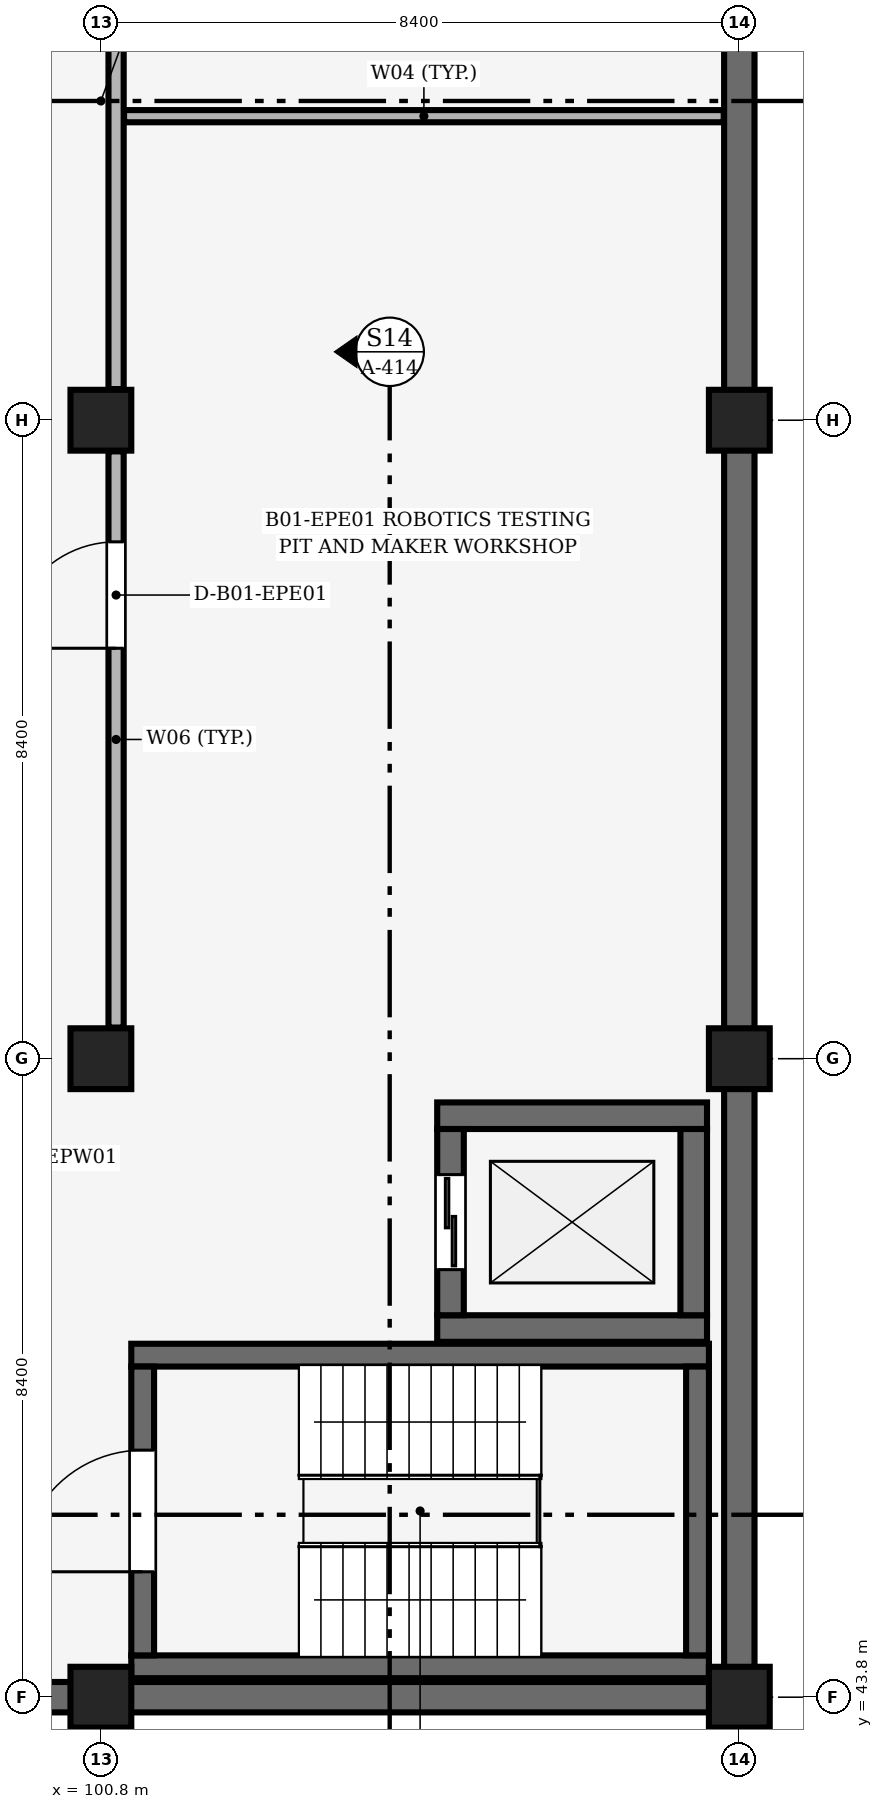
"""IFC4 building model, lengths in metres.
Left out: names, types, materials, properties, quantities, classifications, styles, units other than length and angle.
Written with IfcOpenShell. Run it as: python <this file> out.ifc"""

import sys

from ifc_helpers import new_model, si_unit, direction, frame, frame_2d, origin, origin_2d, place, context, subcontext, project, spatial, rectangle, extrude, element, fill, save


model = new_model("IFC4")
c1 = context("Model", 3, precision=1e-05, world=origin(), true_north=direction((0.0, 1.0)))
c2 = subcontext(c1, "Body", "Model", "MODEL_VIEW")
j1 = project(units=[si_unit("LENGTHUNIT", "METRE"), si_unit("PLANEANGLEUNIT", "RADIAN")], contexts=[c1])
p1 = place(None, origin())
s1 = spatial("IfcSite", under=j1, at=p1, CompositionType="ELEMENT")
p2 = place(p1, origin())
s2 = spatial("IfcBuilding", under=s1, at=p2, CompositionType="ELEMENT")
p3 = place(p2, frame((0.0, 0.0, -4.2)))
s3 = spatial("IfcBuildingStorey", under=s2, at=p3, CompositionType="ELEMENT", Elevation=-4.2)
for number, where, z_axis, x_axis in (
    (1, (100.8, 43.8, 0.0), (0.0, 0.0, 1.0), (1.0, 0.0, 0.0)),
    (2, (100.8, 52.2, 0.0), (0.0, 0.0, 1.0), (1.0, 0.0, 0.0)),
    (3, (100.8, 60.6, 0.0), (0.0, 0.0, 1.0), (1.0, 0.0, 0.0)),
    (4, (109.2, 43.8, 0.0), (0.0, 0.0, 1.0), (1.0, 0.0, 0.0)),
    (5, (109.2, 52.2, 0.0), (0.0, 0.0, 1.0), (1.0, 0.0, 0.0)),
    (6, (109.2, 60.6, 0.0), (0.0, 0.0, 1.0), (1.0, 0.0, 0.0)),
):
    element("IfcColumn", number, at=place(p3, frame(where, z_axis=z_axis, x_axis=x_axis)), inside=s3, PredefinedType="COLUMN", context=c2, shape_type="SweptSolid", body=[
        extrude(rectangle(XDim=0.8, YDim=0.8, at=origin_2d()), origin(), (0.0, 0.0, 1.0), 4.2),
    ])
p4 = place(p3, frame((109.2, 44.175, 0.0), z_axis=(0.0, 0.0, 1.0), x_axis=(0.0, 1.0, 0.0)))
e7 = element("IfcWall", 7, at=p4, inside=s3, PredefinedType="SHEAR", context=c2, shape_type="SweptSolid", body=[
    extrude(rectangle(XDim=7.65, YDim=0.4, at=frame_2d((3.825, 0.0))), origin(), (0.0, 0.0, 1.0), 3.05),
])
p5 = place(p3, frame((109.2, 52.575, 0.0), z_axis=(0.0, 0.0, 1.0), x_axis=(0.0, 1.0, 0.0)))
e8 = element("IfcWall", 8, at=p5, inside=s3, PredefinedType="SHEAR", context=c2, shape_type="SweptSolid", body=[
    extrude(rectangle(XDim=7.65, YDim=0.4, at=frame_2d((3.825, 0.0))), origin(), (0.0, 0.0, 1.0), 3.0),
])
p6 = place(p3, frame((109.2, 60.975, 0.0), z_axis=(0.0, 0.0, 1.0), x_axis=(0.0, 1.0, 0.0)))
e9 = element("IfcWall", 9, at=p6, inside=s3, PredefinedType="SHEAR", context=c2, shape_type="SweptSolid", body=[
    extrude(rectangle(XDim=7.65, YDim=0.4, at=frame_2d((3.825, 0.0))), origin(), (0.0, 0.0, 1.0), 3.0),
])
p7 = place(p3, frame((92.775, 43.8, 0.0), z_axis=(0.0, 0.0, 1.0), x_axis=(1.0, 0.0, 0.0)))
e10 = element("IfcWall", 10, at=p7, inside=s3, PredefinedType="SHEAR", context=c2, shape_type="SweptSolid", body=[
    extrude(rectangle(XDim=7.65, YDim=0.4, at=frame_2d((3.825, 0.0))), origin(), (0.0, 0.0, 1.0), 3.25),
])
p8 = place(p3, frame((101.175, 43.8, 0.0), z_axis=(0.0, 0.0, 1.0), x_axis=(1.0, 0.0, 0.0)))
e11 = element("IfcWall", 11, at=p8, inside=s3, PredefinedType="SHEAR", context=c2, shape_type="SweptSolid", body=[
    extrude(rectangle(XDim=7.65, YDim=0.4, at=frame_2d((3.825, 0.0))), origin(), (0.0, 0.0, 1.0), 3.25),
])
for number, where, z_axis, x_axis in (
    (12, (101.2, 44.2, 0.0), (0.0, 0.0, 1.0), (1.0, 0.0, 0.0)),
    (13, (101.2, 48.3, 0.0), (0.0, 0.0, 1.0), (1.0, 0.0, 0.0)),
):
    element("IfcWall", number, at=place(p3, frame(where, z_axis=z_axis, x_axis=x_axis)), inside=s3, PredefinedType="SHEAR", context=c2, shape_type="SweptSolid", body=[
        extrude(rectangle(XDim=7.6, YDim=0.3, at=frame_2d((3.8, 0.0))), origin(), (0.0, 0.0, 1.0), 4.025),
    ])
p9 = place(p3, frame((101.35, 44.35, 0.0), z_axis=(0.0, 0.0, 1.0), x_axis=(0.0, 1.0, 0.0)))
e14 = element("IfcWall", 14, at=p9, inside=s3, PredefinedType="SHEAR", context=c2, shape_type="SweptSolid", body=[
    extrude(rectangle(XDim=3.8, YDim=0.3, at=frame_2d((1.9, 0.0))), origin(), (0.0, 0.0, 1.0), 4.025),
])
p10 = place(p9, frame((1.1, 0.0, 0.0)))
e15 = element("IfcOpeningElement", 15, at=p10, cuts=e14, PredefinedType="OPENING", context=c2, shape_type="SweptSolid", body=[
    extrude(rectangle(XDim=1.6, YDim=2.2, at=frame_2d((0.8, 1.1))), frame((0.0, 0.16, 0.0), z_axis=(0.0, -1.0, 0.0), x_axis=(1.0, 0.0, 0.0)), (0.0, 0.0, 1.0), 0.32),
])
p11 = place(p3, frame((108.65, 44.35, 0.0), z_axis=(0.0, 0.0, 1.0), x_axis=(0.0, 1.0, 0.0)))
e16 = element("IfcWall", 16, at=p11, inside=s3, PredefinedType="SHEAR", context=c2, shape_type="SweptSolid", body=[
    extrude(rectangle(XDim=3.8, YDim=0.3, at=frame_2d((1.9, 0.0))), origin(), (0.0, 0.0, 1.0), 4.025),
])
for number, where, z_axis, x_axis in (
    (17, (105.225, 48.65, 0.0), (0.0, 0.0, 1.0), (1.0, 0.0, 0.0)),
    (18, (105.225, 51.45, 0.0), (0.0, 0.0, 1.0), (1.0, 0.0, 0.0)),
):
    element("IfcWall", number, at=place(p3, frame(where, z_axis=z_axis, x_axis=x_axis)), inside=s3, PredefinedType="SHEAR", context=c2, shape_type="SweptSolid", body=[
        extrude(rectangle(XDim=3.55, YDim=0.35, at=frame_2d((1.775, 0.0))), origin(), (0.0, 0.0, 1.0), 3.92),
    ])
p12 = place(p3, frame((105.4, 48.825, 0.0), z_axis=(0.0, 0.0, 1.0), x_axis=(0.0, 1.0, 0.0)))
e19 = element("IfcWall", 19, at=p12, inside=s3, PredefinedType="SHEAR", context=c2, shape_type="SweptSolid", body=[
    extrude(rectangle(XDim=2.45, YDim=0.35, at=frame_2d((1.225, 0.0))), origin(), (0.0, 0.0, 1.0), 3.92),
])
p13 = place(p12, frame((0.6, 0.0, 0.0)))
e20 = element("IfcOpeningElement", 20, at=p13, cuts=e19, PredefinedType="OPENING", context=c2, shape_type="SweptSolid", body=[
    extrude(rectangle(XDim=1.25, YDim=2.25, at=frame_2d((0.625, 1.125))), frame((0.0, 0.185, 0.0), z_axis=(0.0, -1.0, 0.0), x_axis=(1.0, 0.0, 0.0)), (0.0, 0.0, 1.0), 0.37),
])
p14 = place(p3, frame((108.6, 48.825, 0.0), z_axis=(0.0, 0.0, 1.0), x_axis=(0.0, 1.0, 0.0)))
e21 = element("IfcWall", 21, at=p14, inside=s3, PredefinedType="SHEAR", context=c2, shape_type="SweptSolid", body=[
    extrude(rectangle(XDim=2.45, YDim=0.35, at=frame_2d((1.225, 0.0))), origin(), (0.0, 0.0, 1.0), 3.92),
])
p15 = place(p3, frame((101.105, 64.6, 0.0), z_axis=(0.0, 0.0, 1.0), x_axis=(1.0, 0.0, 0.0)))
e22 = element("IfcWall", 22, at=p15, inside=s3, PredefinedType="PARTITIONING", context=c2, shape_type="SweptSolid", body=[
    extrude(rectangle(XDim=7.89, YDim=0.16, at=frame_2d((3.945, 0.0))), origin(), (0.0, 0.0, 1.0), 3.9),
])
p16 = place(p3, frame((101.0, 52.61, 0.0), z_axis=(0.0, 0.0, 1.0), x_axis=(0.0, 1.0, 0.0)))
e23 = element("IfcWall", 23, at=p16, inside=s3, PredefinedType="PARTITIONING", context=c2, shape_type="SweptSolid", body=[
    extrude(rectangle(XDim=7.58, YDim=0.2, at=frame_2d((3.79, 0.0))), origin(), (0.0, 0.0, 1.0), 2.85),
])
p17 = place(p16, frame((4.99, 0.0, 0.0)))
e24 = element("IfcOpeningElement", 24, at=p17, cuts=e23, PredefinedType="OPENING", context=c2, shape_type="SweptSolid", body=[
    extrude(rectangle(XDim=1.4, YDim=2.2, at=frame_2d((0.7, 1.1))), frame((0.0, 0.11, 0.0), z_axis=(0.0, -1.0, 0.0), x_axis=(1.0, 0.0, 0.0)), (0.0, 0.0, 1.0), 0.22),
])
p18 = place(p3, frame((101.0, 61.01, 0.0), z_axis=(0.0, 0.0, 1.0), x_axis=(0.0, 1.0, 0.0)))
e25 = element("IfcWall", 25, at=p18, inside=s3, PredefinedType="PARTITIONING", context=c2, shape_type="SweptSolid", body=[
    extrude(rectangle(XDim=7.58, YDim=0.2, at=frame_2d((3.79, 0.0))), origin(), (0.0, 0.0, 1.0), 2.8),
])
p19 = place(p10, origin())
e26 = element("IfcDoor", 26, at=p19, inside=s3, OperationType="DOUBLE_DOOR_SINGLE_SWING", PredefinedType="DOOR", context=c2, shape_type="SweptSolid", body=[
    extrude(rectangle(XDim=1.6, YDim=2.2, at=frame_2d((0.8, 1.1))), frame((0.0, 0.025, 0.0), z_axis=(0.0, -1.0, 0.0), x_axis=(1.0, 0.0, 0.0)), (0.0, 0.0, 1.0), 0.05),
])
fill(e15, e26)
p20 = place(p13, origin())
e27 = element("IfcDoor", 27, at=p20, inside=s3, OperationType="DOUBLE_DOOR_SLIDING", PredefinedType="DOOR", context=c2, shape_type="SweptSolid", body=[
    extrude(rectangle(XDim=1.25, YDim=2.25, at=frame_2d((0.625, 1.125))), frame((0.0, 0.025, 0.0), z_axis=(0.0, -1.0, 0.0), x_axis=(1.0, 0.0, 0.0)), (0.0, 0.0, 1.0), 0.05),
])
fill(e20, e27)
p21 = place(p17, origin())
e28 = element("IfcDoor", 28, at=p21, inside=s3, OperationType="DOUBLE_DOOR_SINGLE_SWING", PredefinedType="DOOR", context=c2, shape_type="SweptSolid", body=[
    extrude(rectangle(XDim=1.4, YDim=2.2, at=frame_2d((0.7, 1.1))), frame((0.0, 0.025, 0.0), z_axis=(0.0, -1.0, 0.0), x_axis=(1.0, 0.0, 0.0)), (0.0, 0.0, 1.0), 0.05),
])
fill(e24, e28)
save(model, sys.argv[1])
